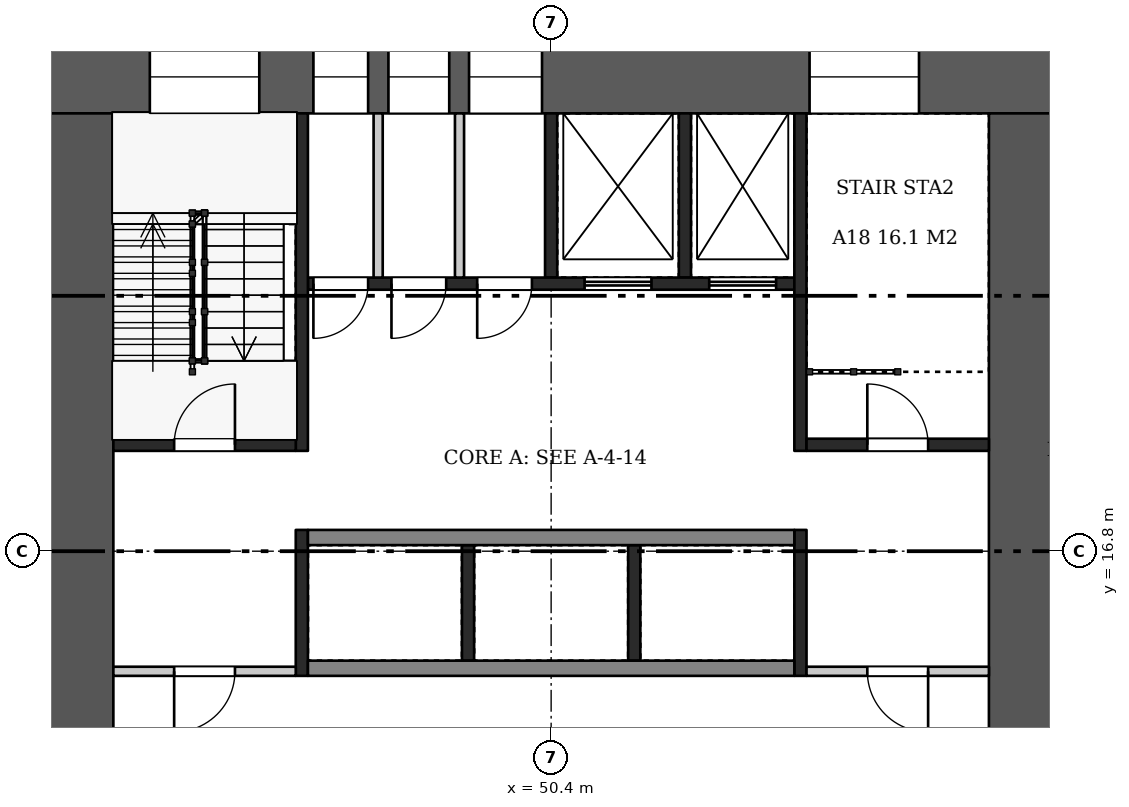
"""IFC4 building model, lengths in metres.
Left out: names, types, materials, properties, quantities, classifications, styles, units other than length and angle.
Written with IfcOpenShell. Run it as: python <this file> out.ifc"""

import sys

from ifc_helpers import new_model, si_unit, direction, frame, frame_2d, origin, place, context, subcontext, project, spatial, rectangle, extrude, element, fill, save


model = new_model("IFC4")
c1 = context("Model", 3, precision=1e-05, world=origin(), true_north=direction((0.0, 1.0)))
c2 = subcontext(c1, "Body", "Model", "MODEL_VIEW")
j1 = project(units=[si_unit("LENGTHUNIT", "METRE"), si_unit("PLANEANGLEUNIT", "RADIAN")], contexts=[c1])
p1 = place(None, origin())
s1 = spatial("IfcSite", under=j1, at=p1, CompositionType="ELEMENT")
p2 = place(p1, origin())
s2 = spatial("IfcBuilding", under=s1, at=p2, CompositionType="ELEMENT")
p3 = place(p2, frame((0.0, 0.0, 74.2)))
s3 = spatial("IfcBuildingStorey", under=s2, at=p3, CompositionType="ELEMENT", Elevation=74.2)
p4 = place(p3, frame((42.0, 24.6, 0.0), z_axis=(0.0, 0.0, 1.0), x_axis=(1.0, 0.0, 0.0)))
e1 = element("IfcWall", 1, at=p4, inside=s3, PredefinedType="SHEAR", context=c2, shape_type="SweptSolid", body=[
    extrude(rectangle(XDim=16.8, YDim=1.2, at=frame_2d((8.4, 0.0))), origin(), (0.0, 0.0, 1.0), 6.72),
])
p5 = place(p4, frame((1.8, 0.0, 0.5)))
e2 = element("IfcOpeningElement", 2, at=p5, cuts=e1, PredefinedType="OPENING", context=c2, shape_type="SweptSolid", body=[
    extrude(rectangle(XDim=1.8, YDim=2.4, at=frame_2d((0.9, 1.2))), frame((0.0, 0.61, 0.0), z_axis=(0.0, -1.0, 0.0), x_axis=(1.0, 0.0, 0.0)), (0.0, 0.0, 1.0), 1.22),
])
p6 = place(p4, frame((4.49, 0.0, 1.6)))
e3 = element("IfcOpeningElement", 3, at=p6, cuts=e1, PredefinedType="OPENING", context=c2, shape_type="SweptSolid", body=[
    extrude(rectangle(XDim=0.9, YDim=1.2, at=frame_2d((0.45, 0.6))), frame((0.0, 0.61, 0.0), z_axis=(0.0, -1.0, 0.0), x_axis=(1.0, 0.0, 0.0)), (0.0, 0.0, 1.0), 1.22),
])
p7 = place(p4, frame((5.724, 0.0, 1.6)))
e4 = element("IfcOpeningElement", 4, at=p7, cuts=e1, PredefinedType="OPENING", context=c2, shape_type="SweptSolid", body=[
    extrude(rectangle(XDim=1.0, YDim=1.2, at=frame_2d((0.5, 0.6))), frame((0.0, 0.61, 0.0), z_axis=(0.0, -1.0, 0.0), x_axis=(1.0, 0.0, 0.0)), (0.0, 0.0, 1.0), 1.22),
])
p8 = place(p4, frame((7.05, 0.0, 1.6)))
e5 = element("IfcOpeningElement", 5, at=p8, cuts=e1, PredefinedType="OPENING", context=c2, shape_type="SweptSolid", body=[
    extrude(rectangle(XDim=1.2, YDim=1.2, at=frame_2d((0.6, 0.6))), frame((0.0, 0.61, 0.0), z_axis=(0.0, -1.0, 0.0), x_axis=(1.0, 0.0, 0.0)), (0.0, 0.0, 1.0), 1.22),
])
p9 = place(p4, frame((12.65, 0.0, 0.5)))
e6 = element("IfcOpeningElement", 6, at=p9, cuts=e1, PredefinedType="OPENING", context=c2, shape_type="SweptSolid", body=[
    extrude(rectangle(XDim=1.8, YDim=2.4, at=frame_2d((0.9, 1.2))), frame((0.0, 0.61, 0.0), z_axis=(0.0, -1.0, 0.0), x_axis=(1.0, 0.0, 0.0)), (0.0, 0.0, 1.0), 1.22),
])
p10 = place(p3, frame((42.6, 9.6, 0.0), z_axis=(0.0, 0.0, 1.0), x_axis=(0.0, 1.0, 0.0)))
e7 = element("IfcWall", 7, at=p10, inside=s3, PredefinedType="SHEAR", context=c2, shape_type="SweptSolid", body=[
    extrude(rectangle(XDim=14.4, YDim=1.2, at=frame_2d((7.2, 0.0))), origin(), (0.0, 0.0, 1.0), 6.72),
])
p11 = place(p10, frame((2.1, 0.0, 0.0)))
e8 = element("IfcOpeningElement", 8, at=p11, cuts=e7, PredefinedType="OPENING", context=c2, shape_type="SweptSolid", body=[
    extrude(rectangle(XDim=1.8, YDim=2.1, at=frame_2d((0.9, 1.05))), frame((0.0, 0.61, 0.0), z_axis=(0.0, -1.0, 0.0), x_axis=(1.0, 0.0, 0.0)), (0.0, 0.0, 1.0), 1.22),
])
p12 = place(p3, frame((58.2, 9.6, 0.0), z_axis=(0.0, 0.0, 1.0), x_axis=(0.0, 1.0, 0.0)))
e9 = element("IfcWall", 9, at=p12, inside=s3, PredefinedType="SHEAR", context=c2, shape_type="SweptSolid", body=[
    extrude(rectangle(XDim=14.4, YDim=1.2, at=frame_2d((7.2, 0.0))), origin(), (0.0, 0.0, 1.0), 6.72),
])
p13 = place(p12, frame((2.1, 0.0, 0.0)))
e10 = element("IfcOpeningElement", 10, at=p13, cuts=e9, PredefinedType="OPENING", context=c2, shape_type="SweptSolid", body=[
    extrude(rectangle(XDim=1.8, YDim=2.1, at=frame_2d((0.9, 1.05))), frame((0.0, 0.61, 0.0), z_axis=(0.0, -1.0, 0.0), x_axis=(1.0, 0.0, 0.0)), (0.0, 0.0, 1.0), 1.22),
])
for number, where, z_axis, x_axis in (
    (11, (49.033, 15.0, 0.0), (0.0, 0.0, 1.0), (0.0, 1.0, 0.0)),
    (12, (51.767, 15.0, 0.0), (0.0, 0.0, 1.0), (0.0, 1.0, 0.0)),
):
    element("IfcWall", number, at=place(p3, frame(where, z_axis=z_axis, x_axis=x_axis)), inside=s3, PredefinedType="SHEAR", context=c2, shape_type="SweptSolid", body=[
        extrude(rectangle(XDim=1.9, YDim=0.2, at=frame_2d((0.95, 0.0))), origin(), (0.0, 0.0, 1.0), 6.72),
    ])
for number, where, z_axis, x_axis in (
    (13, (46.4, 14.875, 0.0), (0.0, 0.0, 1.0), (1.0, 0.0, 0.0)),
    (14, (46.4, 17.025, 0.0), (0.0, 0.0, 1.0), (1.0, 0.0, 0.0)),
):
    element("IfcWall", number, at=place(p3, frame(where, z_axis=z_axis, x_axis=x_axis)), inside=s3, PredefinedType="SHEAR", context=c2, shape_type="SweptSolid", body=[
        extrude(rectangle(XDim=8.0, YDim=0.25, at=frame_2d((4.0, 0.0))), origin(), (0.0, 0.0, 1.0), 6.72),
    ])
for number, where, z_axis, x_axis in (
    (15, (50.4, 21.3, 0.0), (0.0, 0.0, 1.0), (0.0, 1.0, 0.0)),
    (16, (52.6, 21.3, 0.0), (0.0, 0.0, 1.0), (0.0, 1.0, 0.0)),
):
    element("IfcWall", number, at=place(p3, frame(where, z_axis=z_axis, x_axis=x_axis)), inside=s3, PredefinedType="SHEAR", context=c2, shape_type="SweptSolid", body=[
        extrude(rectangle(XDim=2.7, YDim=0.2, at=frame_2d((1.35, 0.0))), origin(), (0.0, 0.0, 1.0), 6.72),
    ])
for number, where, z_axis, x_axis in (
    (17, (47.555, 21.3, 0.0), (0.0, 0.0, 1.0), (0.0, 1.0, 0.0)),
    (18, (48.893, 21.3, 0.0), (0.0, 0.0, 1.0), (0.0, 1.0, 0.0)),
):
    element("IfcWall", number, at=place(p3, frame(where, z_axis=z_axis, x_axis=x_axis)), inside=s3, PredefinedType="PARTITIONING", context=c2, shape_type="SweptSolid", body=[
        extrude(rectangle(XDim=2.7, YDim=0.15, at=frame_2d((1.35, 0.0))), origin(), (0.0, 0.0, 1.0), 6.72),
    ])
p14 = place(p3, frame((46.4, 21.2, 0.0), z_axis=(0.0, 0.0, 1.0), x_axis=(1.0, 0.0, 0.0)))
e19 = element("IfcWall", 19, at=p14, inside=s3, PredefinedType="SHEAR", context=c2, shape_type="SweptSolid", body=[
    extrude(rectangle(XDim=8.0, YDim=0.2, at=frame_2d((4.0, 0.0))), origin(), (0.0, 0.0, 1.0), 6.72),
])
p15 = place(p14, frame((0.09, 0.0, 0.0)))
e20 = element("IfcOpeningElement", 20, at=p15, cuts=e19, PredefinedType="OPENING", context=c2, shape_type="SweptSolid", body=[
    extrude(rectangle(XDim=0.9, YDim=2.1, at=frame_2d((0.45, 1.05))), frame((0.0, 0.11, 0.0), z_axis=(0.0, -1.0, 0.0), x_axis=(1.0, 0.0, 0.0)), (0.0, 0.0, 1.0), 0.22),
])
p16 = place(p14, frame((1.374, 0.0, 0.0)))
e21 = element("IfcOpeningElement", 21, at=p16, cuts=e19, PredefinedType="OPENING", context=c2, shape_type="SweptSolid", body=[
    extrude(rectangle(XDim=0.9, YDim=2.1, at=frame_2d((0.45, 1.05))), frame((0.0, 0.11, 0.0), z_axis=(0.0, -1.0, 0.0), x_axis=(1.0, 0.0, 0.0)), (0.0, 0.0, 1.0), 0.22),
])
p17 = place(p14, frame((2.784, 0.0, 0.0)))
e22 = element("IfcOpeningElement", 22, at=p17, cuts=e19, PredefinedType="OPENING", context=c2, shape_type="SweptSolid", body=[
    extrude(rectangle(XDim=0.9, YDim=2.1, at=frame_2d((0.45, 1.05))), frame((0.0, 0.11, 0.0), z_axis=(0.0, -1.0, 0.0), x_axis=(1.0, 0.0, 0.0)), (0.0, 0.0, 1.0), 0.22),
])
p18 = place(p14, frame((4.55, 0.0, 0.0)))
e23 = element("IfcOpeningElement", 23, at=p18, cuts=e19, PredefinedType="OPENING", context=c2, shape_type="SweptSolid", body=[
    extrude(rectangle(XDim=1.1, YDim=2.1, at=frame_2d((0.55, 1.05))), frame((0.0, 0.11, 0.0), z_axis=(0.0, -1.0, 0.0), x_axis=(1.0, 0.0, 0.0)), (0.0, 0.0, 1.0), 0.22),
])
p19 = place(p14, frame((6.6, 0.0, 0.0)))
e24 = element("IfcOpeningElement", 24, at=p19, cuts=e19, PredefinedType="OPENING", context=c2, shape_type="SweptSolid", body=[
    extrude(rectangle(XDim=1.1, YDim=2.1, at=frame_2d((0.55, 1.05))), frame((0.0, 0.11, 0.0), z_axis=(0.0, -1.0, 0.0), x_axis=(1.0, 0.0, 0.0)), (0.0, 0.0, 1.0), 0.22),
])
p20 = place(p3, frame((46.3, 14.75, 0.0), z_axis=(0.0, 0.0, 1.0), x_axis=(0.0, 1.0, 0.0)))
e25 = element("IfcWall", 25, at=p20, inside=s3, PredefinedType="SHEAR", context=c2, shape_type="SweptSolid", body=[
    extrude(rectangle(XDim=2.4, YDim=0.2, at=frame_2d((1.2, 0.0))), origin(), (0.0, 0.0, 1.0), 6.72),
])
p21 = place(p3, frame((46.3, 18.45, 0.0), z_axis=(0.0, 0.0, 1.0), x_axis=(0.0, 1.0, 0.0)))
e26 = element("IfcWall", 26, at=p21, inside=s3, PredefinedType="SHEAR", context=c2, shape_type="SweptSolid", body=[
    extrude(rectangle(XDim=5.55, YDim=0.2, at=frame_2d((2.775, 0.0))), origin(), (0.0, 0.0, 1.0), 6.72),
])
p22 = place(p3, frame((43.2, 14.825, 0.0), z_axis=(0.0, 0.0, 1.0), x_axis=(1.0, 0.0, 0.0)))
e27 = element("IfcWall", 27, at=p22, inside=s3, PredefinedType="PARTITIONING", context=c2, shape_type="SweptSolid", body=[
    extrude(rectangle(XDim=3.0, YDim=0.15, at=frame_2d((1.5, 0.0))), origin(), (0.0, 0.0, 1.0), 6.72),
])
p23 = place(p22, frame((1.0, 0.0, 0.0)))
e28 = element("IfcOpeningElement", 28, at=p23, cuts=e27, PredefinedType="OPENING", context=c2, shape_type="SweptSolid", body=[
    extrude(rectangle(XDim=1.0, YDim=2.1, at=frame_2d((0.5, 1.05))), frame((0.0, 0.085, 0.0), z_axis=(0.0, -1.0, 0.0), x_axis=(1.0, 0.0, 0.0)), (0.0, 0.0, 1.0), 0.17),
])
p24 = place(p3, frame((43.2, 18.55, 0.0), z_axis=(0.0, 0.0, 1.0), x_axis=(1.0, 0.0, 0.0)))
e29 = element("IfcWall", 29, at=p24, inside=s3, PredefinedType="SHEAR", context=c2, shape_type="SweptSolid", body=[
    extrude(rectangle(XDim=3.0, YDim=0.2, at=frame_2d((1.5, 0.0))), origin(), (0.0, 0.0, 1.0), 6.72),
])
p25 = place(p24, frame((1.0, 0.0, 0.0)))
e30 = element("IfcOpeningElement", 30, at=p25, cuts=e29, PredefinedType="OPENING", context=c2, shape_type="SweptSolid", body=[
    extrude(rectangle(XDim=1.0, YDim=2.1, at=frame_2d((0.5, 1.05))), frame((0.0, 0.11, 0.0), z_axis=(0.0, -1.0, 0.0), x_axis=(1.0, 0.0, 0.0)), (0.0, 0.0, 1.0), 0.22),
])
p26 = place(p3, frame((54.5, 14.75, 0.0), z_axis=(0.0, 0.0, 1.0), x_axis=(0.0, 1.0, 0.0)))
e31 = element("IfcWall", 31, at=p26, inside=s3, PredefinedType="SHEAR", context=c2, shape_type="SweptSolid", body=[
    extrude(rectangle(XDim=2.4, YDim=0.2, at=frame_2d((1.2, 0.0))), origin(), (0.0, 0.0, 1.0), 6.72),
])
p27 = place(p3, frame((54.5, 18.45, 0.0), z_axis=(0.0, 0.0, 1.0), x_axis=(0.0, 1.0, 0.0)))
e32 = element("IfcWall", 32, at=p27, inside=s3, PredefinedType="SHEAR", context=c2, shape_type="SweptSolid", body=[
    extrude(rectangle(XDim=5.55, YDim=0.2, at=frame_2d((2.775, 0.0))), origin(), (0.0, 0.0, 1.0), 6.72),
])
p28 = place(p3, frame((54.6, 14.825, 0.0), z_axis=(0.0, 0.0, 1.0), x_axis=(1.0, 0.0, 0.0)))
e33 = element("IfcWall", 33, at=p28, inside=s3, PredefinedType="PARTITIONING", context=c2, shape_type="SweptSolid", body=[
    extrude(rectangle(XDim=3.0, YDim=0.15, at=frame_2d((1.5, 0.0))), origin(), (0.0, 0.0, 1.0), 6.72),
])
p29 = place(p28, frame((1.0, 0.0, 0.0)))
e34 = element("IfcOpeningElement", 34, at=p29, cuts=e33, PredefinedType="OPENING", context=c2, shape_type="SweptSolid", body=[
    extrude(rectangle(XDim=1.0, YDim=2.1, at=frame_2d((0.5, 1.05))), frame((0.0, 0.085, 0.0), z_axis=(0.0, -1.0, 0.0), x_axis=(1.0, 0.0, 0.0)), (0.0, 0.0, 1.0), 0.17),
])
p30 = place(p3, frame((54.6, 18.55, 0.0), z_axis=(0.0, 0.0, 1.0), x_axis=(1.0, 0.0, 0.0)))
e35 = element("IfcWall", 35, at=p30, inside=s3, PredefinedType="SHEAR", context=c2, shape_type="SweptSolid", body=[
    extrude(rectangle(XDim=3.0, YDim=0.2, at=frame_2d((1.5, 0.0))), origin(), (0.0, 0.0, 1.0), 6.72),
])
p31 = place(p30, frame((1.0, 0.0, 0.0)))
e36 = element("IfcOpeningElement", 36, at=p31, cuts=e35, PredefinedType="OPENING", context=c2, shape_type="SweptSolid", body=[
    extrude(rectangle(XDim=1.0, YDim=2.1, at=frame_2d((0.5, 1.05))), frame((0.0, 0.11, 0.0), z_axis=(0.0, -1.0, 0.0), x_axis=(1.0, 0.0, 0.0)), (0.0, 0.0, 1.0), 0.22),
])
p32 = place(p15, frame((0.9, 0.0, 0.0), z_axis=(0.0, 0.0, 1.0), x_axis=(-1.0, 0.0, 0.0)))
e37 = element("IfcDoor", 37, at=p32, inside=s3, OperationType="SINGLE_SWING_RIGHT", PredefinedType="DOOR", context=c2, shape_type="SweptSolid", body=[
    extrude(rectangle(XDim=0.9, YDim=2.1, at=frame_2d((0.45, 1.05))), frame((0.0, 0.025, 0.0), z_axis=(0.0, -1.0, 0.0), x_axis=(1.0, 0.0, 0.0)), (0.0, 0.0, 1.0), 0.05),
])
fill(e20, e37)
p33 = place(p16, frame((0.9, 0.0, 0.0), z_axis=(0.0, 0.0, 1.0), x_axis=(-1.0, 0.0, 0.0)))
e38 = element("IfcDoor", 38, at=p33, inside=s3, OperationType="SINGLE_SWING_RIGHT", PredefinedType="DOOR", context=c2, shape_type="SweptSolid", body=[
    extrude(rectangle(XDim=0.9, YDim=2.1, at=frame_2d((0.45, 1.05))), frame((0.0, 0.025, 0.0), z_axis=(0.0, -1.0, 0.0), x_axis=(1.0, 0.0, 0.0)), (0.0, 0.0, 1.0), 0.05),
])
fill(e21, e38)
p34 = place(p17, frame((0.9, 0.0, 0.0), z_axis=(0.0, 0.0, 1.0), x_axis=(-1.0, 0.0, 0.0)))
e39 = element("IfcDoor", 39, at=p34, inside=s3, OperationType="SINGLE_SWING_RIGHT", PredefinedType="DOOR", context=c2, shape_type="SweptSolid", body=[
    extrude(rectangle(XDim=0.9, YDim=2.1, at=frame_2d((0.45, 1.05))), frame((0.0, 0.025, 0.0), z_axis=(0.0, -1.0, 0.0), x_axis=(1.0, 0.0, 0.0)), (0.0, 0.0, 1.0), 0.05),
])
fill(e22, e39)
p35 = place(p18, origin())
e40 = element("IfcDoor", 40, at=p35, inside=s3, OperationType="DOUBLE_DOOR_SLIDING", PredefinedType="DOOR", context=c2, shape_type="SweptSolid", body=[
    extrude(rectangle(XDim=1.1, YDim=2.1, at=frame_2d((0.55, 1.05))), frame((0.0, 0.025, 0.0), z_axis=(0.0, -1.0, 0.0), x_axis=(1.0, 0.0, 0.0)), (0.0, 0.0, 1.0), 0.05),
])
fill(e23, e40)
p36 = place(p19, origin())
e41 = element("IfcDoor", 41, at=p36, inside=s3, OperationType="DOUBLE_DOOR_SLIDING", PredefinedType="DOOR", context=c2, shape_type="SweptSolid", body=[
    extrude(rectangle(XDim=1.1, YDim=2.1, at=frame_2d((0.55, 1.05))), frame((0.0, 0.025, 0.0), z_axis=(0.0, -1.0, 0.0), x_axis=(1.0, 0.0, 0.0)), (0.0, 0.0, 1.0), 0.05),
])
fill(e24, e41)
p37 = place(p23, frame((1.0, 0.0, 0.0), z_axis=(0.0, 0.0, 1.0), x_axis=(-1.0, 0.0, 0.0)))
e42 = element("IfcDoor", 42, at=p37, inside=s3, OperationType="SINGLE_SWING_RIGHT", PredefinedType="DOOR", context=c2, shape_type="SweptSolid", body=[
    extrude(rectangle(XDim=1.0, YDim=2.1, at=frame_2d((0.5, 1.05))), frame((0.0, 0.025, 0.0), z_axis=(0.0, -1.0, 0.0), x_axis=(1.0, 0.0, 0.0)), (0.0, 0.0, 1.0), 0.05),
])
fill(e28, e42)
p38 = place(p25, origin())
e43 = element("IfcDoor", 43, at=p38, inside=s3, OperationType="SINGLE_SWING_RIGHT", PredefinedType="DOOR", context=c2, shape_type="SweptSolid", body=[
    extrude(rectangle(XDim=1.0, YDim=2.1, at=frame_2d((0.5, 1.05))), frame((0.0, 0.025, 0.0), z_axis=(0.0, -1.0, 0.0), x_axis=(1.0, 0.0, 0.0)), (0.0, 0.0, 1.0), 0.05),
])
fill(e30, e43)
p39 = place(p29, frame((1.0, 0.0, 0.0), z_axis=(0.0, 0.0, 1.0), x_axis=(-1.0, 0.0, 0.0)))
e44 = element("IfcDoor", 44, at=p39, inside=s3, OperationType="SINGLE_SWING_LEFT", PredefinedType="DOOR", context=c2, shape_type="SweptSolid", body=[
    extrude(rectangle(XDim=1.0, YDim=2.1, at=frame_2d((0.5, 1.05))), frame((0.0, 0.025, 0.0), z_axis=(0.0, -1.0, 0.0), x_axis=(1.0, 0.0, 0.0)), (0.0, 0.0, 1.0), 0.05),
])
fill(e34, e44)
p40 = place(p31, origin())
e45 = element("IfcDoor", 45, at=p40, inside=s3, OperationType="SINGLE_SWING_LEFT", PredefinedType="DOOR", context=c2, shape_type="SweptSolid", body=[
    extrude(rectangle(XDim=1.0, YDim=2.1, at=frame_2d((0.5, 1.05))), frame((0.0, 0.025, 0.0), z_axis=(0.0, -1.0, 0.0), x_axis=(1.0, 0.0, 0.0)), (0.0, 0.0, 1.0), 0.05),
])
fill(e36, e45)
p41 = place(p5, origin())
e46 = element("IfcWindow", 46, at=p41, inside=s3, PartitioningType="SINGLE_PANEL", PredefinedType="WINDOW", context=c2, shape_type="SweptSolid", body=[
    extrude(rectangle(XDim=1.8, YDim=2.4, at=frame_2d((0.9, 1.2))), frame((0.0, 0.03, 0.0), z_axis=(0.0, -1.0, 0.0), x_axis=(1.0, 0.0, 0.0)), (0.0, 0.0, 1.0), 0.06),
])
fill(e2, e46)
p42 = place(p6, origin())
e47 = element("IfcWindow", 47, at=p42, inside=s3, PartitioningType="SINGLE_PANEL", PredefinedType="WINDOW", context=c2, shape_type="SweptSolid", body=[
    extrude(rectangle(XDim=0.9, YDim=1.2, at=frame_2d((0.45, 0.6))), frame((0.0, 0.03, 0.0), z_axis=(0.0, -1.0, 0.0), x_axis=(1.0, 0.0, 0.0)), (0.0, 0.0, 1.0), 0.06),
])
fill(e3, e47)
p43 = place(p7, origin())
e48 = element("IfcWindow", 48, at=p43, inside=s3, PartitioningType="SINGLE_PANEL", PredefinedType="WINDOW", context=c2, shape_type="SweptSolid", body=[
    extrude(rectangle(XDim=1.0, YDim=1.2, at=frame_2d((0.5, 0.6))), frame((0.0, 0.03, 0.0), z_axis=(0.0, -1.0, 0.0), x_axis=(1.0, 0.0, 0.0)), (0.0, 0.0, 1.0), 0.06),
])
fill(e4, e48)
p44 = place(p8, origin())
e49 = element("IfcWindow", 49, at=p44, inside=s3, PartitioningType="SINGLE_PANEL", PredefinedType="WINDOW", context=c2, shape_type="SweptSolid", body=[
    extrude(rectangle(XDim=1.2, YDim=1.2, at=frame_2d((0.6, 0.6))), frame((0.0, 0.03, 0.0), z_axis=(0.0, -1.0, 0.0), x_axis=(1.0, 0.0, 0.0)), (0.0, 0.0, 1.0), 0.06),
])
fill(e5, e49)
p45 = place(p9, origin())
e50 = element("IfcWindow", 50, at=p45, inside=s3, PartitioningType="SINGLE_PANEL", PredefinedType="WINDOW", context=c2, shape_type="SweptSolid", body=[
    extrude(rectangle(XDim=1.8, YDim=2.4, at=frame_2d((0.9, 1.2))), frame((0.0, 0.03, 0.0), z_axis=(0.0, -1.0, 0.0), x_axis=(1.0, 0.0, 0.0)), (0.0, 0.0, 1.0), 0.06),
])
fill(e6, e50)
save(model, sys.argv[1])
